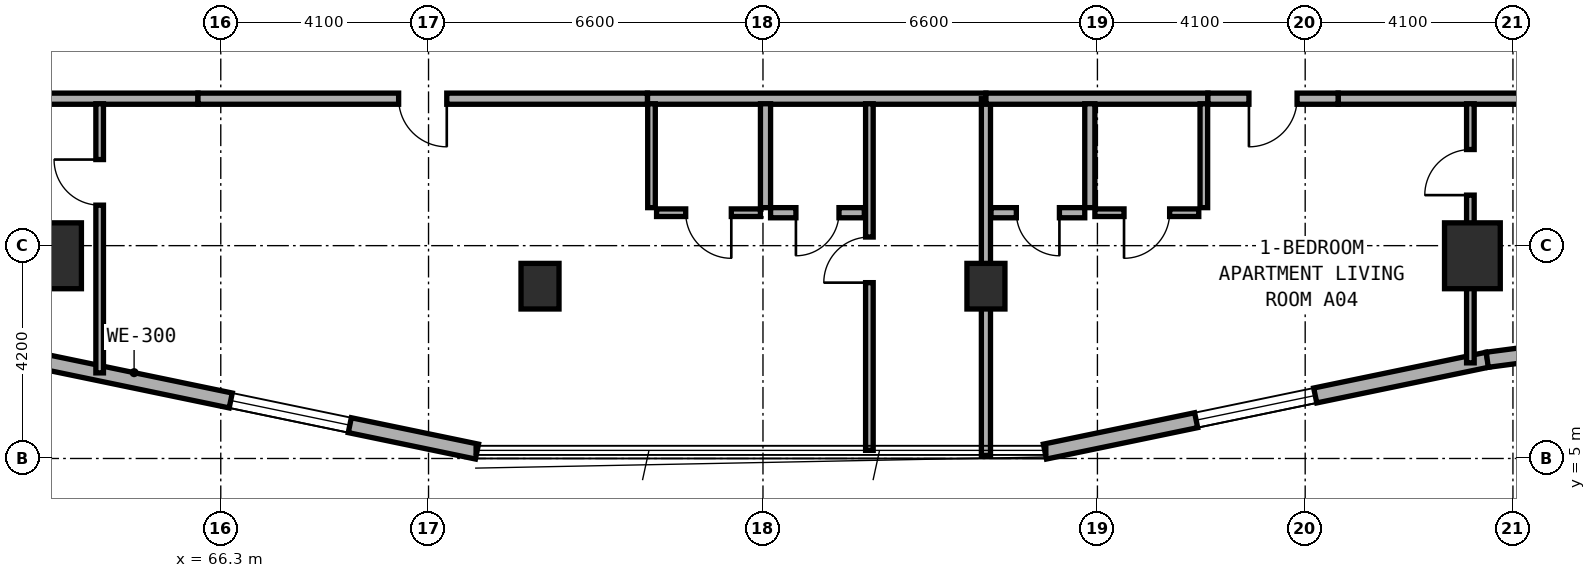
"""IFC4 building model, lengths in metres.
Left out: names, types, materials, properties, quantities, classifications, styles, units other than length and angle.
Written with IfcOpenShell. Run it as: python <this file> out.ifc"""

import sys

from ifc_helpers import new_model, si_unit, direction, frame, frame_2d, origin, origin_2d, place, context, subcontext, project, spatial, rectangle, extrude, element, fill, save


model = new_model("IFC4")
c1 = context("Model", 3, precision=1e-05, world=origin(), true_north=direction((0.0, 1.0)))
c2 = subcontext(c1, "Body", "Model", "MODEL_VIEW")
j1 = project(units=[si_unit("LENGTHUNIT", "METRE"), si_unit("PLANEANGLEUNIT", "RADIAN")], contexts=[c1])
p1 = place(None, origin())
s1 = spatial("IfcSite", under=j1, at=p1, CompositionType="ELEMENT")
p2 = place(p1, origin())
s2 = spatial("IfcBuilding", under=s1, at=p2, CompositionType="ELEMENT")
p3 = place(p2, frame((0.0, 0.0, 45.0)))
s3 = spatial("IfcBuildingStorey", under=s2, at=p3, CompositionType="ELEMENT", Elevation=45.0)
for number, where, z_axis, x_axis in (
    (1, (72.6, 8.4, 0.0), (0.0, 0.0, 1.0), (1.0, 0.0, 0.0)),
    (2, (81.4, 8.4, 0.0), (0.0, 0.0, 1.0), (1.0, 0.0, 0.0)),
):
    element("IfcColumn", number, at=place(p3, frame(where, z_axis=z_axis, x_axis=x_axis)), inside=s3, PredefinedType="COLUMN", context=c2, shape_type="SweptSolid", body=[
        extrude(rectangle(XDim=0.75, YDim=0.9, at=origin_2d()), origin(), (0.0, 0.0, 1.0), 3.5),
    ])
for number, where, z_axis, x_axis in (
    (3, (63.0, 9.0, 0.0), (0.0, 0.0, 1.0), (1.0, 0.0, 0.0)),
    (4, (91.0, 9.0, 0.0), (0.0, 0.0, 1.0), (1.0, 0.0, 0.0)),
):
    element("IfcColumn", number, at=place(p3, frame(where, z_axis=z_axis, x_axis=x_axis)), inside=s3, PredefinedType="COLUMN", context=c2, shape_type="SweptSolid", body=[
        extrude(rectangle(XDim=1.1, YDim=1.3, at=origin_2d()), origin(), (0.0, 0.0, 1.0), 3.5),
    ])
p4 = place(p3, frame((62.622, 6.949, 0.0), z_axis=(0.0, 0.0, 1.0), x_axis=(0.979127260729, -0.203248142175, 0.0)))
e5 = element("IfcWall", 5, at=p4, inside=s3, PredefinedType="STANDARD", context=c2, shape_type="SweptSolid", body=[
    extrude(rectangle(XDim=8.92, YDim=0.3, at=frame_2d((4.46, 0.0))), origin(), (0.0, 0.0, 1.0), 3.25),
])
p5 = place(p4, frame((3.957, 0.0, 0.8)))
e6 = element("IfcOpeningElement", 6, at=p5, cuts=e5, PredefinedType="OPENING", context=c2, shape_type="SweptSolid", body=[
    extrude(rectangle(XDim=2.4, YDim=1.6, at=frame_2d((1.2, 0.8))), frame((0.0, 0.16, 0.0), z_axis=(0.0, -1.0, 0.0), x_axis=(1.0, 0.0, 0.0)), (0.0, 0.0, 1.0), 0.32),
])
p6 = place(p3, frame((82.564, 5.136, 0.0), z_axis=(0.0, 0.0, 1.0), x_axis=(0.979128391325, 0.203242695569, 0.0)))
e7 = element("IfcWall", 7, at=p6, inside=s3, PredefinedType="STANDARD", context=c2, shape_type="SweptSolid", body=[
    extrude(rectangle(XDim=8.92, YDim=0.3, at=frame_2d((4.46, 0.0))), origin(), (0.0, 0.0, 1.0), 3.25),
])
p7 = place(p6, frame((3.048, 0.0, 0.8)))
e8 = element("IfcOpeningElement", 8, at=p7, cuts=e7, PredefinedType="OPENING", context=c2, shape_type="SweptSolid", body=[
    extrude(rectangle(XDim=2.4, YDim=1.6, at=frame_2d((1.2, 0.8))), frame((0.0, 0.16, 0.0), z_axis=(0.0, -1.0, 0.0), x_axis=(1.0, 0.0, 0.0)), (0.0, 0.0, 1.0), 0.32),
])
p8 = place(p3, frame((91.293, 6.948, 0.0), z_axis=(0.0, 0.0, 1.0), x_axis=(0.991486167159, 0.13021205909, 0.0)))
e9 = element("IfcWall", 9, at=p8, inside=s3, PredefinedType="STANDARD", context=c2, shape_type="SweptSolid", body=[
    extrude(rectangle(XDim=0.729, YDim=0.3, at=frame_2d((0.365, 0.0))), origin(), (0.0, 0.0, 1.0), 3.25),
])
p9 = place(p3, frame((58.16, 12.1, 0.0), z_axis=(0.0, 0.0, 1.0), x_axis=(1.0, 0.0, 0.0)))
e10 = element("IfcWall", 10, at=p9, inside=s3, PredefinedType="SOLIDWALL", context=c2, shape_type="SweptSolid", body=[
    extrude(rectangle(XDim=7.69, YDim=0.22, at=frame_2d((3.845, 0.0))), origin(), (0.0, 0.0, 1.0), 2.865),
])
p10 = place(p3, frame((74.72, 12.1, 0.0), z_axis=(0.0, 0.0, 1.0), x_axis=(1.0, 0.0, 0.0)))
e11 = element("IfcWall", 11, at=p10, inside=s3, PredefinedType="SOLIDWALL", context=c2, shape_type="SweptSolid", body=[
    extrude(rectangle(XDim=6.68, YDim=0.22, at=frame_2d((3.34, 0.0))), origin(), (0.0, 0.0, 1.0), 2.725),
])
p11 = place(p3, frame((65.85, 12.1, 0.0), z_axis=(0.0, 0.0, 1.0), x_axis=(1.0, 0.0, 0.0)))
e12 = element("IfcWall", 12, at=p11, inside=s3, PredefinedType="SOLIDWALL", context=c2, shape_type="SweptSolid", body=[
    extrude(rectangle(XDim=8.87, YDim=0.22, at=frame_2d((4.435, 0.0))), origin(), (0.0, 0.0, 1.0), 2.725),
])
p12 = place(p11, frame((3.96, 0.0, 0.0)))
e13 = element("IfcOpeningElement", 13, at=p12, cuts=e12, PredefinedType="OPENING", context=c2, shape_type="SweptSolid", body=[
    extrude(rectangle(XDim=0.95, YDim=2.1, at=frame_2d((0.475, 1.05))), frame((0.0, 0.12, 0.0), z_axis=(0.0, -1.0, 0.0), x_axis=(1.0, 0.0, 0.0)), (0.0, 0.0, 1.0), 0.24),
])
p13 = place(p3, frame((63.91, 6.689, 0.0), z_axis=(0.0, 0.0, 1.0), x_axis=(0.0, 1.0, 0.0)))
e14 = element("IfcWall", 14, at=p13, inside=s3, PredefinedType="PARTITIONING", context=c2, shape_type="SweptSolid", body=[
    extrude(rectangle(XDim=5.311, YDim=0.15, at=frame_2d((2.656, 0.0))), origin(), (0.0, 0.0, 1.0), 2.865),
])
p14 = place(p13, frame((3.31, 0.0, 0.0)))
e15 = element("IfcOpeningElement", 15, at=p14, cuts=e14, PredefinedType="OPENING", context=c2, shape_type="SweptSolid", body=[
    extrude(rectangle(XDim=0.9, YDim=2.1, at=frame_2d((0.45, 1.05))), frame((0.0, 0.085, 0.0), z_axis=(0.0, -1.0, 0.0), x_axis=(1.0, 0.0, 0.0)), (0.0, 0.0, 1.0), 0.17),
])
p15 = place(p3, frame((79.1, 5.16, 0.0), z_axis=(0.0, 0.0, 1.0), x_axis=(0.0, 1.0, 0.0)))
e16 = element("IfcWall", 16, at=p15, inside=s3, PredefinedType="PARTITIONING", context=c2, shape_type="SweptSolid", body=[
    extrude(rectangle(XDim=6.84, YDim=0.15, at=frame_2d((3.42, 0.0))), origin(), (0.0, 0.0, 1.0), 2.865),
])
p16 = place(p15, frame((3.31, 0.0, 0.0)))
e17 = element("IfcOpeningElement", 17, at=p16, cuts=e16, PredefinedType="OPENING", context=c2, shape_type="SweptSolid", body=[
    extrude(rectangle(XDim=0.9, YDim=2.1, at=frame_2d((0.45, 1.05))), frame((0.0, 0.085, 0.0), z_axis=(0.0, -1.0, 0.0), x_axis=(1.0, 0.0, 0.0)), (0.0, 0.0, 1.0), 0.17),
])
p17 = place(p3, frame((77.05, 9.95, 0.0), z_axis=(0.0, 0.0, 1.0), x_axis=(0.0, 1.0, 0.0)))
e18 = element("IfcWall", 18, at=p17, inside=s3, PredefinedType="PLUMBINGWALL", context=c2, shape_type="SweptSolid", body=[
    extrude(rectangle(XDim=2.05, YDim=0.2, at=frame_2d((1.025, 0.0))), origin(), (0.0, 0.0, 1.0), 2.955),
])
p18 = place(p3, frame((74.8, 9.95, 0.0), z_axis=(0.0, 0.0, 1.0), x_axis=(0.0, 1.0, 0.0)))
e19 = element("IfcWall", 19, at=p18, inside=s3, PredefinedType="PARTITIONING", context=c2, shape_type="SweptSolid", body=[
    extrude(rectangle(XDim=2.05, YDim=0.15, at=frame_2d((1.025, 0.0))), origin(), (0.0, 0.0, 1.0), 2.955),
])
p19 = place(p3, frame((77.15, 9.85, 0.0), z_axis=(0.0, 0.0, 1.0), x_axis=(1.0, 0.0, 0.0)))
e20 = element("IfcWall", 20, at=p19, inside=s3, PredefinedType="PLUMBINGWALL", context=c2, shape_type="SweptSolid", body=[
    extrude(rectangle(XDim=1.85, YDim=0.2, at=frame_2d((0.925, 0.0))), origin(), (0.0, 0.0, 1.0), 3.22),
])
p20 = place(p19, frame((0.5, 0.0, 0.0)))
e21 = element("IfcOpeningElement", 21, at=p20, cuts=e20, PredefinedType="OPENING", context=c2, shape_type="SweptSolid", body=[
    extrude(rectangle(XDim=0.85, YDim=2.1, at=frame_2d((0.425, 1.05))), frame((0.0, 0.11, 0.0), z_axis=(0.0, -1.0, 0.0), x_axis=(1.0, 0.0, 0.0)), (0.0, 0.0, 1.0), 0.22),
])
p21 = place(p3, frame((74.9, 9.85, 0.0), z_axis=(0.0, 0.0, 1.0), x_axis=(1.0, 0.0, 0.0)))
e22 = element("IfcWall", 22, at=p21, inside=s3, PredefinedType="PARTITIONING", context=c2, shape_type="SweptSolid", body=[
    extrude(rectangle(XDim=2.05, YDim=0.15, at=frame_2d((1.025, 0.0))), origin(), (0.0, 0.0, 1.0), 3.22),
])
p22 = place(p21, frame((0.575, 0.0, 0.0)))
e23 = element("IfcOpeningElement", 23, at=p22, cuts=e22, PredefinedType="OPENING", context=c2, shape_type="SweptSolid", body=[
    extrude(rectangle(XDim=0.9, YDim=2.1, at=frame_2d((0.45, 1.05))), frame((0.0, 0.085, 0.0), z_axis=(0.0, -1.0, 0.0), x_axis=(1.0, 0.0, 0.0)), (0.0, 0.0, 1.0), 0.17),
])
p23 = place(p3, frame((81.4, 5.06, 0.0), z_axis=(0.0, 0.0, 1.0), x_axis=(0.0, 1.0, 0.0)))
e24 = element("IfcWall", 24, at=p23, inside=s3, PredefinedType="SOLIDWALL", context=c2, shape_type="SweptSolid", body=[
    extrude(rectangle(XDim=7.04, YDim=0.18, at=frame_2d((3.52, 0.0))), origin(), (0.0, 0.0, 1.0), 2.725),
])
p24 = place(p3, frame((81.4, 12.1, 0.0), z_axis=(0.0, 0.0, 1.0), x_axis=(1.0, 0.0, 0.0)))
e25 = element("IfcWall", 25, at=p24, inside=s3, PredefinedType="SOLIDWALL", context=c2, shape_type="SweptSolid", body=[
    extrude(rectangle(XDim=4.38, YDim=0.22, at=frame_2d((2.19, 0.0))), origin(), (0.0, 0.0, 1.0), 2.725),
])
p25 = place(p3, frame((88.35, 12.1, 0.0), z_axis=(0.0, 0.0, 1.0), x_axis=(1.0, 0.0, 0.0)))
e26 = element("IfcWall", 26, at=p25, inside=s3, PredefinedType="SOLIDWALL", context=c2, shape_type="SweptSolid", body=[
    extrude(rectangle(XDim=7.41, YDim=0.22, at=frame_2d((3.705, 0.0))), origin(), (0.0, 0.0, 1.0), 2.865),
])
p26 = place(p3, frame((85.78, 12.1, 0.0), z_axis=(0.0, 0.0, 1.0), x_axis=(1.0, 0.0, 0.0)))
e27 = element("IfcWall", 27, at=p26, inside=s3, PredefinedType="SOLIDWALL", context=c2, shape_type="SweptSolid", body=[
    extrude(rectangle(XDim=2.57, YDim=0.22, at=frame_2d((1.285, 0.0))), origin(), (0.0, 0.0, 1.0), 3.22),
])
p27 = place(p26, frame((0.81, 0.0, 0.0)))
e28 = element("IfcOpeningElement", 28, at=p27, cuts=e27, PredefinedType="OPENING", context=c2, shape_type="SweptSolid", body=[
    extrude(rectangle(XDim=0.95, YDim=2.1, at=frame_2d((0.475, 1.05))), frame((0.0, 0.12, 0.0), z_axis=(0.0, -1.0, 0.0), x_axis=(1.0, 0.0, 0.0)), (0.0, 0.0, 1.0), 0.24),
])
p28 = place(p3, frame((90.96, 6.887, 0.0), z_axis=(0.0, 0.0, 1.0), x_axis=(0.0, 1.0, 0.0)))
e29 = element("IfcWall", 29, at=p28, inside=s3, PredefinedType="PARTITIONING", context=c2, shape_type="SweptSolid", body=[
    extrude(rectangle(XDim=5.113, YDim=0.15, at=frame_2d((2.557, 0.0))), origin(), (0.0, 0.0, 1.0), 2.865),
])
p29 = place(p28, frame((3.31, 0.0, 0.0)))
e30 = element("IfcOpeningElement", 30, at=p29, cuts=e29, PredefinedType="OPENING", context=c2, shape_type="SweptSolid", body=[
    extrude(rectangle(XDim=0.9, YDim=2.1, at=frame_2d((0.45, 1.05))), frame((0.0, 0.085, 0.0), z_axis=(0.0, -1.0, 0.0), x_axis=(1.0, 0.0, 0.0)), (0.0, 0.0, 1.0), 0.17),
])
p30 = place(p3, frame((83.45, 9.95, 0.0), z_axis=(0.0, 0.0, 1.0), x_axis=(0.0, 1.0, 0.0)))
e31 = element("IfcWall", 31, at=p30, inside=s3, PredefinedType="PLUMBINGWALL", context=c2, shape_type="SweptSolid", body=[
    extrude(rectangle(XDim=2.05, YDim=0.2, at=frame_2d((1.025, 0.0))), origin(), (0.0, 0.0, 1.0), 3.22),
])
p31 = place(p3, frame((85.7, 9.95, 0.0), z_axis=(0.0, 0.0, 1.0), x_axis=(0.0, 1.0, 0.0)))
e32 = element("IfcWall", 32, at=p31, inside=s3, PredefinedType="PARTITIONING", context=c2, shape_type="SweptSolid", body=[
    extrude(rectangle(XDim=2.05, YDim=0.15, at=frame_2d((1.025, 0.0))), origin(), (0.0, 0.0, 1.0), 3.22),
])
p32 = place(p3, frame((81.5, 9.85, 0.0), z_axis=(0.0, 0.0, 1.0), x_axis=(1.0, 0.0, 0.0)))
e33 = element("IfcWall", 33, at=p32, inside=s3, PredefinedType="PLUMBINGWALL", context=c2, shape_type="SweptSolid", body=[
    extrude(rectangle(XDim=1.85, YDim=0.2, at=frame_2d((0.925, 0.0))), origin(), (0.0, 0.0, 1.0), 2.725),
])
p33 = place(p32, frame((0.5, 0.0, 0.0)))
e34 = element("IfcOpeningElement", 34, at=p33, cuts=e33, PredefinedType="OPENING", context=c2, shape_type="SweptSolid", body=[
    extrude(rectangle(XDim=0.85, YDim=2.1, at=frame_2d((0.425, 1.05))), frame((0.0, 0.11, 0.0), z_axis=(0.0, -1.0, 0.0), x_axis=(1.0, 0.0, 0.0)), (0.0, 0.0, 1.0), 0.22),
])
p34 = place(p3, frame((83.55, 9.85, 0.0), z_axis=(0.0, 0.0, 1.0), x_axis=(1.0, 0.0, 0.0)))
e35 = element("IfcWall", 35, at=p34, inside=s3, PredefinedType="PARTITIONING", context=c2, shape_type="SweptSolid", body=[
    extrude(rectangle(XDim=2.05, YDim=0.15, at=frame_2d((1.025, 0.0))), origin(), (0.0, 0.0, 1.0), 3.22),
])
p35 = place(p34, frame((0.575, 0.0, 0.0)))
e36 = element("IfcOpeningElement", 36, at=p35, cuts=e35, PredefinedType="OPENING", context=c2, shape_type="SweptSolid", body=[
    extrude(rectangle(XDim=0.9, YDim=2.1, at=frame_2d((0.45, 1.05))), frame((0.0, 0.085, 0.0), z_axis=(0.0, -1.0, 0.0), x_axis=(1.0, 0.0, 0.0)), (0.0, 0.0, 1.0), 0.17),
])
p36 = place(p5, origin())
e37 = element("IfcWindow", 37, at=p36, inside=s3, PartitioningType="SINGLE_PANEL", PredefinedType="WINDOW", context=c2, shape_type="SweptSolid", body=[
    extrude(rectangle(XDim=2.4, YDim=1.6, at=frame_2d((1.2, 0.8))), frame((0.0, 0.03, 0.0), z_axis=(0.0, -1.0, 0.0), x_axis=(1.0, 0.0, 0.0)), (0.0, 0.0, 1.0), 0.06),
])
fill(e6, e37)
p37 = place(p7, origin())
e38 = element("IfcWindow", 38, at=p37, inside=s3, PartitioningType="SINGLE_PANEL", PredefinedType="WINDOW", context=c2, shape_type="SweptSolid", body=[
    extrude(rectangle(XDim=2.4, YDim=1.6, at=frame_2d((1.2, 0.8))), frame((0.0, 0.03, 0.0), z_axis=(0.0, -1.0, 0.0), x_axis=(1.0, 0.0, 0.0)), (0.0, 0.0, 1.0), 0.06),
])
fill(e8, e38)
p38 = place(p12, frame((0.95, 0.0, 0.0), z_axis=(0.0, 0.0, 1.0), x_axis=(-1.0, 0.0, 0.0)))
e39 = element("IfcDoor", 39, at=p38, inside=s3, OperationType="SINGLE_SWING_LEFT", PredefinedType="DOOR", context=c2, shape_type="SweptSolid", body=[
    extrude(rectangle(XDim=0.95, YDim=2.1, at=frame_2d((0.475, 1.05))), frame((0.0, 0.025, 0.0), z_axis=(0.0, -1.0, 0.0), x_axis=(1.0, 0.0, 0.0)), (0.0, 0.0, 1.0), 0.05),
])
fill(e13, e39)
p39 = place(p14, origin())
e40 = element("IfcDoor", 40, at=p39, inside=s3, OperationType="SINGLE_SWING_RIGHT", PredefinedType="DOOR", context=c2, shape_type="SweptSolid", body=[
    extrude(rectangle(XDim=0.9, YDim=2.1, at=frame_2d((0.45, 1.05))), frame((0.0, 0.025, 0.0), z_axis=(0.0, -1.0, 0.0), x_axis=(1.0, 0.0, 0.0)), (0.0, 0.0, 1.0), 0.05),
])
fill(e15, e40)
p40 = place(p16, origin())
e41 = element("IfcDoor", 41, at=p40, inside=s3, OperationType="SINGLE_SWING_LEFT", PredefinedType="DOOR", context=c2, shape_type="SweptSolid", body=[
    extrude(rectangle(XDim=0.9, YDim=2.1, at=frame_2d((0.45, 1.05))), frame((0.0, 0.025, 0.0), z_axis=(0.0, -1.0, 0.0), x_axis=(1.0, 0.0, 0.0)), (0.0, 0.0, 1.0), 0.05),
])
fill(e17, e41)
p41 = place(p20, frame((0.85, 0.0, 0.0), z_axis=(0.0, 0.0, 1.0), x_axis=(-1.0, 0.0, 0.0)))
e42 = element("IfcDoor", 42, at=p41, inside=s3, OperationType="SINGLE_SWING_RIGHT", PredefinedType="DOOR", context=c2, shape_type="SweptSolid", body=[
    extrude(rectangle(XDim=0.85, YDim=2.1, at=frame_2d((0.425, 1.05))), frame((0.0, 0.025, 0.0), z_axis=(0.0, -1.0, 0.0), x_axis=(1.0, 0.0, 0.0)), (0.0, 0.0, 1.0), 0.05),
])
fill(e21, e42)
p42 = place(p22, frame((0.9, 0.0, 0.0), z_axis=(0.0, 0.0, 1.0), x_axis=(-1.0, 0.0, 0.0)))
e43 = element("IfcDoor", 43, at=p42, inside=s3, OperationType="SINGLE_SWING_LEFT", PredefinedType="DOOR", context=c2, shape_type="SweptSolid", body=[
    extrude(rectangle(XDim=0.9, YDim=2.1, at=frame_2d((0.45, 1.05))), frame((0.0, 0.025, 0.0), z_axis=(0.0, -1.0, 0.0), x_axis=(1.0, 0.0, 0.0)), (0.0, 0.0, 1.0), 0.05),
])
fill(e23, e43)
p43 = place(p27, frame((0.95, 0.0, 0.0), z_axis=(0.0, 0.0, 1.0), x_axis=(-1.0, 0.0, 0.0)))
e44 = element("IfcDoor", 44, at=p43, inside=s3, OperationType="SINGLE_SWING_RIGHT", PredefinedType="DOOR", context=c2, shape_type="SweptSolid", body=[
    extrude(rectangle(XDim=0.95, YDim=2.1, at=frame_2d((0.475, 1.05))), frame((0.0, 0.025, 0.0), z_axis=(0.0, -1.0, 0.0), x_axis=(1.0, 0.0, 0.0)), (0.0, 0.0, 1.0), 0.05),
])
fill(e28, e44)
p44 = place(p29, origin())
e45 = element("IfcDoor", 45, at=p44, inside=s3, OperationType="SINGLE_SWING_LEFT", PredefinedType="DOOR", context=c2, shape_type="SweptSolid", body=[
    extrude(rectangle(XDim=0.9, YDim=2.1, at=frame_2d((0.45, 1.05))), frame((0.0, 0.025, 0.0), z_axis=(0.0, -1.0, 0.0), x_axis=(1.0, 0.0, 0.0)), (0.0, 0.0, 1.0), 0.05),
])
fill(e30, e45)
p45 = place(p33, frame((0.85, 0.0, 0.0), z_axis=(0.0, 0.0, 1.0), x_axis=(-1.0, 0.0, 0.0)))
e46 = element("IfcDoor", 46, at=p45, inside=s3, OperationType="SINGLE_SWING_LEFT", PredefinedType="DOOR", context=c2, shape_type="SweptSolid", body=[
    extrude(rectangle(XDim=0.85, YDim=2.1, at=frame_2d((0.425, 1.05))), frame((0.0, 0.025, 0.0), z_axis=(0.0, -1.0, 0.0), x_axis=(1.0, 0.0, 0.0)), (0.0, 0.0, 1.0), 0.05),
])
fill(e34, e46)
p46 = place(p35, frame((0.9, 0.0, 0.0), z_axis=(0.0, 0.0, 1.0), x_axis=(-1.0, 0.0, 0.0)))
e47 = element("IfcDoor", 47, at=p46, inside=s3, OperationType="SINGLE_SWING_RIGHT", PredefinedType="DOOR", context=c2, shape_type="SweptSolid", body=[
    extrude(rectangle(XDim=0.9, YDim=2.1, at=frame_2d((0.45, 1.05))), frame((0.0, 0.025, 0.0), z_axis=(0.0, -1.0, 0.0), x_axis=(1.0, 0.0, 0.0)), (0.0, 0.0, 1.0), 0.05),
])
fill(e36, e47)
save(model, sys.argv[1])
